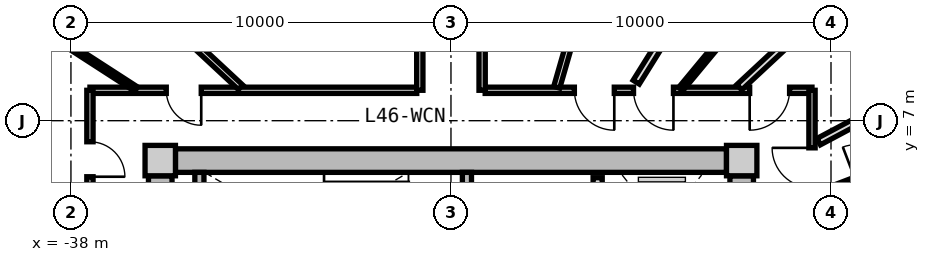
"""IFC4 building model, lengths in metres.
Left out: names, types, materials, properties, quantities, classifications, styles, units other than length and angle.
Written with IfcOpenShell. Run it as: python <this file> out.ifc"""

import sys

from ifc_helpers import new_model, si_unit, direction, frame, frame_2d, origin, origin_2d, place, context, subcontext, project, spatial, rectangle, extrude, source, transform, mapped, element, fill, save


model = new_model("IFC4")
c1 = context("Model", 3, precision=1e-05, world=origin(), true_north=direction((0.0, 1.0)))
c2 = subcontext(c1, "Body", "Model", "MODEL_VIEW")
j1 = project(units=[si_unit("LENGTHUNIT", "METRE"), si_unit("PLANEANGLEUNIT", "RADIAN")], contexts=[c1])
p1 = place(None, origin())
s1 = spatial("IfcSite", under=j1, at=p1, CompositionType="ELEMENT")
p2 = place(p1, origin())
s2 = spatial("IfcBuilding", under=s1, at=p2, CompositionType="ELEMENT")
p3 = place(p2, frame((0.0, 0.0, 149.55)))
s3 = spatial("IfcBuildingStorey", under=s2, at=p3, CompositionType="ELEMENT", Elevation=149.55)
m1 = source(origin(), c2, "Body", "SweptSolid", [
    extrude(rectangle(XDim=0.8, YDim=0.8, at=origin_2d()), origin(), (0.0, 0.0, 1.0), 3.05),
])
for number, where, z_axis, x_axis in (
    (1, (-20.35, 5.95, 0.0), (0.0, 0.0, 1.0), (1.0, 0.0, 0.0)),
    (2, (-35.65, 5.95, 0.0), (0.0, 0.0, 1.0), (1.0, 0.0, 0.0)),
):
    element("IfcColumn", number, at=place(p3, frame(where, z_axis=z_axis, x_axis=x_axis)), inside=s3, PredefinedType="COLUMN", context=c2, shape_type="MappedRepresentation", body=[
        mapped(m1, transform((0.0, 0.0, 0.0), x_axis=(1.0, 0.0, 0.0), y_axis=(0.0, 1.0, 0.0), z_axis=(0.0, 0.0, 1.0), scale=1.0)),
    ])
m2 = source(origin(), c2, "Body", "SweptSolid", [
    extrude(rectangle(XDim=14.5, YDim=0.62, at=frame_2d((7.25, 0.0))), origin(), (0.0, 0.0, 1.0), 2.81),
])
p4 = place(p3, frame((-35.25, 5.95, 0.0), z_axis=(0.0, 0.0, 1.0), x_axis=(1.0, 0.0, 0.0)))
e3 = element("IfcWall", 3, at=p4, inside=s3, PredefinedType="SHEAR", context=c2, shape_type="MappedRepresentation", body=[
    mapped(m2, transform((0.0, 0.0, 0.0), x_axis=(1.0, 0.0, 0.0), y_axis=(0.0, 1.0, 0.0), z_axis=(0.0, 0.0, 1.0), scale=1.0)),
])
m3 = source(origin(), c2, "Body", "SweptSolid", [
    extrude(rectangle(XDim=11.1, YDim=0.62, at=frame_2d((5.55, 0.0))), origin(), (0.0, 0.0, 1.0), 2.81),
])
p5 = place(p3, frame((-35.65, -5.55, 0.0), z_axis=(0.0, 0.0, 1.0), x_axis=(0.0, 1.0, 0.0)))
e4 = element("IfcWall", 4, at=p5, inside=s3, PredefinedType="SHEAR", context=c2, shape_type="MappedRepresentation", body=[
    mapped(m3, transform((0.0, 0.0, 0.0), x_axis=(1.0, 0.0, 0.0), y_axis=(0.0, 1.0, 0.0), z_axis=(0.0, 0.0, 1.0), scale=1.0)),
])
p6 = place(p5, frame((3.8, 0.0, 0.0)))
e5 = element("IfcOpeningElement", 5, at=p6, cuts=e4, PredefinedType="OPENING", context=c2, shape_type="SweptSolid", body=[
    extrude(rectangle(XDim=1.2, YDim=2.15, at=frame_2d((0.6, 1.075))), frame((0.0, 0.32, 0.0), z_axis=(0.0, -1.0, 0.0), x_axis=(1.0, 0.0, 0.0)), (0.0, 0.0, 1.0), 0.64),
])
p7 = place(p3, frame((-20.35, 5.55, 0.0), z_axis=(0.0, 0.0, 1.0), x_axis=(0.0, -1.0, 0.0)))
e6 = element("IfcWall", 6, at=p7, inside=s3, PredefinedType="SHEAR", context=c2, shape_type="MappedRepresentation", body=[
    mapped(m3, transform((0.0, 0.0, 0.0), x_axis=(1.0, 0.0, 0.0), y_axis=(0.0, 1.0, 0.0), z_axis=(0.0, 0.0, 1.0), scale=1.0)),
])
p8 = place(p7, frame((5.65, 0.0, 0.0)))
e7 = element("IfcOpeningElement", 7, at=p8, cuts=e6, PredefinedType="OPENING", context=c2, shape_type="SweptSolid", body=[
    extrude(rectangle(XDim=1.2, YDim=2.15, at=frame_2d((0.6, 1.075))), frame((0.0, 0.32, 0.0), z_axis=(0.0, -1.0, 0.0), x_axis=(1.0, 0.0, 0.0)), (0.0, 0.0, 1.0), 0.64),
])
p9 = place(p7, frame((9.3, 0.0, 0.0)))
e8 = element("IfcOpeningElement", 8, at=p9, cuts=e6, PredefinedType="OPENING", context=c2, shape_type="SweptSolid", body=[
    extrude(rectangle(XDim=1.0, YDim=2.1, at=frame_2d((0.5, 1.05))), frame((0.0, 0.32, 0.0), z_axis=(0.0, -1.0, 0.0), x_axis=(1.0, 0.0, 0.0)), (0.0, 0.0, 1.0), 0.64),
])
m4 = source(origin(), c2, "Body", "SweptSolid", [
    extrude(rectangle(XDim=3.19, YDim=0.24, at=frame_2d((1.595, 0.0))), origin(), (0.0, 0.0, 1.0), 2.81),
])
p10 = place(p3, frame((-34.62, 2.45, 0.0), z_axis=(0.0, 0.0, 1.0), x_axis=(0.0, 1.0, 0.0)))
e9 = element("IfcWall", 9, at=p10, inside=s3, PredefinedType="PARTITIONING", context=c2, shape_type="MappedRepresentation", body=[
    mapped(m4, transform((0.0, 0.0, 0.0), x_axis=(1.0, 0.0, 0.0), y_axis=(0.0, 1.0, 0.0), z_axis=(0.0, 0.0, 1.0), scale=1.0)),
])
p11 = place(p3, frame((-27.58, 2.45, 0.0), z_axis=(0.0, 0.0, 1.0), x_axis=(0.0, 1.0, 0.0)))
e10 = element("IfcWall", 10, at=p11, inside=s3, PredefinedType="PARTITIONING", context=c2, shape_type="MappedRepresentation", body=[
    mapped(m4, transform((0.0, 0.0, 0.0), x_axis=(1.0, 0.0, 0.0), y_axis=(0.0, 1.0, 0.0), z_axis=(0.0, 0.0, 1.0), scale=1.0)),
])
p12 = place(p11, frame((0.55, 0.0, 0.0)))
e11 = element("IfcOpeningElement", 11, at=p12, cuts=e10, PredefinedType="OPENING", context=c2, shape_type="SweptSolid", body=[
    extrude(rectangle(XDim=1.1, YDim=2.15, at=frame_2d((0.55, 1.075))), frame((0.0, 0.13, 0.0), z_axis=(0.0, -1.0, 0.0), x_axis=(1.0, 0.0, 0.0)), (0.0, 0.0, 1.0), 0.26),
])
m5 = source(origin(), c2, "Body", "SweptSolid", [
    extrude(rectangle(XDim=5.0, YDim=0.24, at=frame_2d((2.5, 0.0))), origin(), (0.0, 0.0, 1.0), 2.795),
])
p13 = place(p3, frame((-24.14, 0.5, 0.0), z_axis=(0.0, 0.0, 1.0), x_axis=(0.0, 1.0, 0.0)))
e12 = element("IfcWall", 12, at=p13, inside=s3, PredefinedType="PARTITIONING", context=c2, shape_type="MappedRepresentation", body=[
    mapped(m5, transform((0.0, 0.0, 0.0), x_axis=(1.0, 0.0, 0.0), y_axis=(0.0, 1.0, 0.0), z_axis=(0.0, 0.0, 1.0), scale=1.0)),
])
p14 = place(p13, frame((3.05, 0.0, 0.0)))
e13 = element("IfcOpeningElement", 13, at=p14, cuts=e12, PredefinedType="OPENING", context=c2, shape_type="SweptSolid", body=[
    extrude(rectangle(XDim=1.3, YDim=2.2, at=frame_2d((0.65, 1.1))), frame((0.0, 0.13, 0.0), z_axis=(0.0, -1.0, 0.0), x_axis=(1.0, 0.0, 0.0)), (0.0, 0.0, 1.0), 0.26),
])
p15 = place(p13, frame((0.55, 0.0, 0.0)))
e14 = element("IfcOpeningElement", 14, at=p15, cuts=e12, PredefinedType="OPENING", context=c2, shape_type="SweptSolid", body=[
    extrude(rectangle(XDim=1.3, YDim=2.2, at=frame_2d((0.65, 1.1))), frame((0.0, 0.13, 0.0), z_axis=(0.0, -1.0, 0.0), x_axis=(1.0, 0.0, 0.0)), (0.0, 0.0, 1.0), 0.26),
])
m6 = source(origin(), c2, "Body", "SweptSolid", [
    extrude(rectangle(XDim=8.6, YDim=0.165, at=frame_2d((4.3, 0.0))), origin(), (0.0, 0.0, 1.0), 2.795),
])
p16 = place(p3, frame((-37.5, 7.8, 0.0), z_axis=(0.0, 0.0, 1.0), x_axis=(1.0, 0.0, 0.0)))
e15 = element("IfcWall", 15, at=p16, inside=s3, PredefinedType="PARTITIONING", context=c2, shape_type="MappedRepresentation", body=[
    mapped(m6, transform((0.0, 0.0, 0.0), x_axis=(1.0, 0.0, 0.0), y_axis=(0.0, 1.0, 0.0), z_axis=(0.0, 0.0, 1.0), scale=1.0)),
])
p17 = place(p16, frame((2.009, 0.0, 0.0)))
e16 = element("IfcOpeningElement", 16, at=p17, cuts=e15, PredefinedType="OPENING", context=c2, shape_type="SweptSolid", body=[
    extrude(rectangle(XDim=0.92, YDim=2.1, at=frame_2d((0.46, 1.05))), frame((0.0, 0.093, 0.0), z_axis=(0.0, -1.0, 0.0), x_axis=(1.0, 0.0, 0.0)), (0.0, 0.0, 1.0), 0.185),
])
p18 = place(p3, frame((-27.1, 7.8, 0.0), z_axis=(0.0, 0.0, 1.0), x_axis=(1.0, 0.0, 0.0)))
e17 = element("IfcWall", 17, at=p18, inside=s3, PredefinedType="PARTITIONING", context=c2, shape_type="MappedRepresentation", body=[
    mapped(m6, transform((0.0, 0.0, 0.0), x_axis=(1.0, 0.0, 0.0), y_axis=(0.0, 1.0, 0.0), z_axis=(0.0, 0.0, 1.0), scale=1.0)),
])
p19 = place(p18, frame((6.96, 0.0, 0.0)))
e18 = element("IfcOpeningElement", 18, at=p19, cuts=e17, PredefinedType="OPENING", context=c2, shape_type="SweptSolid", body=[
    extrude(rectangle(XDim=1.05, YDim=2.15, at=frame_2d((0.525, 1.075))), frame((0.0, 0.093, 0.0), z_axis=(0.0, -1.0, 0.0), x_axis=(1.0, 0.0, 0.0)), (0.0, 0.0, 1.0), 0.185),
])
p20 = place(p18, frame((3.904, 0.0, 0.0)))
e19 = element("IfcOpeningElement", 19, at=p20, cuts=e17, PredefinedType="OPENING", context=c2, shape_type="SweptSolid", body=[
    extrude(rectangle(XDim=1.05, YDim=2.15, at=frame_2d((0.525, 1.075))), frame((0.0, 0.093, 0.0), z_axis=(0.0, -1.0, 0.0), x_axis=(1.0, 0.0, 0.0)), (0.0, 0.0, 1.0), 0.185),
])
p21 = place(p18, frame((2.347, 0.0, 0.0)))
e20 = element("IfcOpeningElement", 20, at=p21, cuts=e17, PredefinedType="OPENING", context=c2, shape_type="SweptSolid", body=[
    extrude(rectangle(XDim=1.05, YDim=2.15, at=frame_2d((0.525, 1.075))), frame((0.0, 0.093, 0.0), z_axis=(0.0, -1.0, 0.0), x_axis=(1.0, 0.0, 0.0)), (0.0, 0.0, 1.0), 0.185),
])
m7 = source(origin(), c2, "Body", "SweptSolid", [
    extrude(rectangle(XDim=15.6, YDim=0.165, at=frame_2d((7.8, 0.0))), origin(), (0.0, 0.0, 1.0), 2.795),
])
p22 = place(p3, frame((-37.5, -7.8, 0.0), z_axis=(0.0, 0.0, 1.0), x_axis=(0.0, 1.0, 0.0)))
e21 = element("IfcWall", 21, at=p22, inside=s3, PredefinedType="PARTITIONING", context=c2, shape_type="MappedRepresentation", body=[
    mapped(m7, transform((0.0, 0.0, 0.0), x_axis=(1.0, 0.0, 0.0), y_axis=(0.0, 1.0, 0.0), z_axis=(0.0, 0.0, 1.0), scale=1.0)),
])
p23 = place(p22, frame((13.325, 0.0, 0.0)))
e22 = element("IfcOpeningElement", 22, at=p23, cuts=e21, PredefinedType="OPENING", context=c2, shape_type="SweptSolid", body=[
    extrude(rectangle(XDim=0.92, YDim=2.1, at=frame_2d((0.46, 1.05))), frame((0.0, 0.093, 0.0), z_axis=(0.0, -1.0, 0.0), x_axis=(1.0, 0.0, 0.0)), (0.0, 0.0, 1.0), 0.185),
])
p24 = place(p22, frame((5.628, 0.0, 0.0)))
e23 = element("IfcOpeningElement", 23, at=p24, cuts=e21, PredefinedType="OPENING", context=c2, shape_type="SweptSolid", body=[
    extrude(rectangle(XDim=1.25, YDim=2.2, at=frame_2d((0.625, 1.1))), frame((0.0, 0.093, 0.0), z_axis=(0.0, -1.0, 0.0), x_axis=(1.0, 0.0, 0.0)), (0.0, 0.0, 1.0), 0.185),
])
p25 = place(p3, frame((-18.5, 7.8, 0.0), z_axis=(0.0, 0.0, 1.0), x_axis=(0.0, -1.0, 0.0)))
e24 = element("IfcWall", 24, at=p25, inside=s3, PredefinedType="PARTITIONING", context=c2, shape_type="MappedRepresentation", body=[
    mapped(m7, transform((0.0, 0.0, 0.0), x_axis=(1.0, 0.0, 0.0), y_axis=(0.0, 1.0, 0.0), z_axis=(0.0, 0.0, 1.0), scale=1.0)),
])
p26 = place(p25, frame((8.314, 0.0, 0.0)))
e25 = element("IfcOpeningElement", 25, at=p26, cuts=e24, PredefinedType="OPENING", context=c2, shape_type="SweptSolid", body=[
    extrude(rectangle(XDim=1.25, YDim=2.2, at=frame_2d((0.625, 1.1))), frame((0.0, 0.093, 0.0), z_axis=(0.0, -1.0, 0.0), x_axis=(1.0, 0.0, 0.0)), (0.0, 0.0, 1.0), 0.185),
])
p27 = place(p25, frame((1.515, 0.0, 0.0)))
e26 = element("IfcOpeningElement", 26, at=p27, cuts=e24, PredefinedType="OPENING", context=c2, shape_type="SweptSolid", body=[
    extrude(rectangle(XDim=1.05, YDim=2.15, at=frame_2d((0.525, 1.075))), frame((0.0, 0.093, 0.0), z_axis=(0.0, -1.0, 0.0), x_axis=(1.0, 0.0, 0.0)), (0.0, 0.0, 1.0), 0.185),
])
m8 = source(origin(), c2, "Body", "SweptSolid", [
    extrude(rectangle(XDim=9.73, YDim=0.165, at=frame_2d((4.865, 0.0))), origin(), (0.0, 0.0, 1.0), 2.345),
])
p28 = place(p3, frame((-25.217, 7.88, 0.0), z_axis=(0.0, 0.0, 1.0), x_axis=(0.27679492614, 0.960929013436, 0.0)))
e27 = element("IfcWall", 27, at=p28, inside=s3, PredefinedType="PARTITIONING", context=c2, shape_type="MappedRepresentation", body=[
    mapped(m8, transform((0.0, 0.0, 0.0), x_axis=(1.0, 0.0, 0.0), y_axis=(0.0, 1.0, 0.0), z_axis=(0.0, 0.0, 1.0), scale=1.0)),
])
m9 = source(origin(), c2, "Body", "SweptSolid", [
    extrude(rectangle(XDim=7.648, YDim=0.165, at=frame_2d((3.824, 0.0))), origin(), (0.0, 0.0, 1.0), 2.345),
])
p29 = place(p3, frame((-33.538, 7.88, 0.0), z_axis=(0.0, 0.0, 1.0), x_axis=(-0.732167856666, 0.681124239522, 0.0)))
e28 = element("IfcWall", 28, at=p29, inside=s3, PredefinedType="PARTITIONING", context=c2, shape_type="MappedRepresentation", body=[
    mapped(m9, transform((0.0, 0.0, 0.0), x_axis=(1.0, 0.0, 0.0), y_axis=(0.0, 1.0, 0.0), z_axis=(0.0, 0.0, 1.0), scale=1.0)),
])
m10 = source(origin(), c2, "Body", "SweptSolid", [
    extrude(rectangle(XDim=8.235, YDim=0.165, at=frame_2d((4.118, 0.0))), origin(), (0.0, 0.0, 1.0), 2.795),
])
p30 = place(p3, frame((-28.82, 7.8, 0.0), z_axis=(0.0, 0.0, 1.0), x_axis=(0.0, 1.0, 0.0)))
e29 = element("IfcWall", 29, at=p30, inside=s3, PredefinedType="PARTITIONING", context=c2, shape_type="MappedRepresentation", body=[
    mapped(m10, transform((0.0, 0.0, 0.0), x_axis=(1.0, 0.0, 0.0), y_axis=(0.0, 1.0, 0.0), z_axis=(0.0, 0.0, 1.0), scale=1.0)),
])
p31 = place(p30, frame((3.593, 0.0, 0.0)))
e30 = element("IfcOpeningElement", 30, at=p31, cuts=e29, PredefinedType="OPENING", context=c2, shape_type="SweptSolid", body=[
    extrude(rectangle(XDim=1.05, YDim=2.15, at=frame_2d((0.525, 1.075))), frame((0.0, 0.093, 0.0), z_axis=(0.0, -1.0, 0.0), x_axis=(1.0, 0.0, 0.0)), (0.0, 0.0, 1.0), 0.185),
])
p32 = place(p3, frame((-27.18, 7.8, 0.0), z_axis=(0.0, 0.0, 1.0), x_axis=(0.0, 1.0, 0.0)))
e31 = element("IfcWall", 31, at=p32, inside=s3, PredefinedType="PARTITIONING", context=c2, shape_type="MappedRepresentation", body=[
    mapped(m10, transform((0.0, 0.0, 0.0), x_axis=(1.0, 0.0, 0.0), y_axis=(0.0, 1.0, 0.0), z_axis=(0.0, 0.0, 1.0), scale=1.0)),
])
p33 = place(p32, frame((3.593, 0.0, 0.0)))
e32 = element("IfcOpeningElement", 32, at=p33, cuts=e31, PredefinedType="OPENING", context=c2, shape_type="SweptSolid", body=[
    extrude(rectangle(XDim=1.05, YDim=2.15, at=frame_2d((0.525, 1.075))), frame((0.0, 0.093, 0.0), z_axis=(0.0, -1.0, 0.0), x_axis=(1.0, 0.0, 0.0)), (0.0, 0.0, 1.0), 0.185),
])
m11 = source(origin(), c2, "Body", "SweptSolid", [
    extrude(rectangle(XDim=6.193, YDim=0.19, at=frame_2d((3.096, 0.0))), origin(), (0.0, 0.0, 1.0), 2.345),
])
p34 = place(p3, frame((-37.58, 4.419, 0.0), z_axis=(0.0, 0.0, 1.0), x_axis=(-0.970309243466, 0.241867674657, 0.0)))
e33 = element("IfcWall", 33, at=p34, inside=s3, PredefinedType="PARTITIONING", context=c2, shape_type="MappedRepresentation", body=[
    mapped(m11, transform((0.0, 0.0, 0.0), x_axis=(1.0, 0.0, 0.0), y_axis=(0.0, 1.0, 0.0), z_axis=(0.0, 0.0, 1.0), scale=1.0)),
])
m12 = source(origin(), c2, "Body", "SweptSolid", [
    extrude(rectangle(XDim=5.197, YDim=0.14, at=frame_2d((2.598, 0.0))), origin(), (0.0, 0.0, 1.0), 2.795),
])
p35 = place(p3, frame((-36.286, 7.83, 0.0), z_axis=(0.0, 0.0, 1.0), x_axis=(-0.839929187515, 0.542696010637, 0.0)))
e34 = element("IfcWall", 34, at=p35, inside=s3, PredefinedType="PARTITIONING", context=c2, shape_type="MappedRepresentation", body=[
    mapped(m12, transform((0.0, 0.0, 0.0), x_axis=(1.0, 0.0, 0.0), y_axis=(0.0, 1.0, 0.0), z_axis=(0.0, 0.0, 1.0), scale=1.0)),
])
m13 = source(origin(), c2, "Body", "SweptSolid", [
    extrude(rectangle(XDim=8.305, YDim=0.19, at=frame_2d((4.153, 0.0))), origin(), (0.0, 0.0, 1.0), 2.345),
])
p36 = place(p3, frame((-18.42, 3.908, 0.0), z_axis=(0.0, 0.0, 1.0), x_axis=(0.970309994378, 0.241864662175, 0.0)))
e35 = element("IfcWall", 35, at=p36, inside=s3, PredefinedType="PARTITIONING", context=c2, shape_type="MappedRepresentation", body=[
    mapped(m13, transform((0.0, 0.0, 0.0), x_axis=(1.0, 0.0, 0.0), y_axis=(0.0, 1.0, 0.0), z_axis=(0.0, 0.0, 1.0), scale=1.0)),
])
m14 = source(origin(), c2, "Body", "SweptSolid", [
    extrude(rectangle(XDim=7.648, YDim=0.19, at=frame_2d((3.824, 0.0))), origin(), (0.0, 0.0, 1.0), 2.345),
])
p37 = place(p3, frame((-20.413, 7.88, 0.0), z_axis=(0.0, 0.0, 1.0), x_axis=(0.732182665826, 0.681108320213, 0.0)))
e36 = element("IfcWall", 36, at=p37, inside=s3, PredefinedType="PARTITIONING", context=c2, shape_type="MappedRepresentation", body=[
    mapped(m14, transform((0.0, 0.0, 0.0), x_axis=(1.0, 0.0, 0.0), y_axis=(0.0, 1.0, 0.0), z_axis=(0.0, 0.0, 1.0), scale=1.0)),
])
m15 = source(origin(), c2, "Body", "SweptSolid", [
    extrude(rectangle(XDim=6.499, YDim=0.19, at=frame_2d((3.25, 0.0))), origin(), (0.0, 0.0, 1.0), 2.795),
])
p38 = place(p3, frame((-18.324, 6.449, 0.0), z_axis=(0.0, 0.0, 1.0), x_axis=(0.882715595921, 0.469907625729, 0.0)))
e37 = element("IfcWall", 37, at=p38, inside=s3, PredefinedType="PARTITIONING", context=c2, shape_type="MappedRepresentation", body=[
    mapped(m15, transform((0.0, 0.0, 0.0), x_axis=(1.0, 0.0, 0.0), y_axis=(0.0, 1.0, 0.0), z_axis=(0.0, 0.0, 1.0), scale=1.0)),
])
m16 = source(origin(), c2, "Body", "SweptSolid", [
    extrude(rectangle(XDim=3.295, YDim=0.14, at=frame_2d((1.647, 0.0))), origin(), (0.0, 0.0, 1.0), 2.795),
])
p39 = place(p3, frame((-18.47, 5.023, 0.0), z_axis=(0.0, 0.0, 1.0), x_axis=(0.934202224769, 0.356743890258, 0.0)))
e38 = element("IfcWall", 38, at=p39, inside=s3, PredefinedType="PARTITIONING", context=c2, shape_type="MappedRepresentation", body=[
    mapped(m16, transform((0.0, 0.0, 0.0), x_axis=(1.0, 0.0, 0.0), y_axis=(0.0, 1.0, 0.0), z_axis=(0.0, 0.0, 1.0), scale=1.0)),
])
p40 = place(p39, frame((1.188, 0.0, 0.0)))
e39 = element("IfcOpeningElement", 39, at=p40, cuts=e38, PredefinedType="OPENING", context=c2, shape_type="SweptSolid", body=[
    extrude(rectangle(XDim=0.92, YDim=2.1, at=frame_2d((0.46, 1.05))), frame((0.0, 0.08, 0.0), z_axis=(0.0, -1.0, 0.0), x_axis=(1.0, 0.0, 0.0)), (0.0, 0.0, 1.0), 0.16),
])
m17 = source(origin(), c2, "Body", "SweptSolid", [
    extrude(rectangle(XDim=8.422, YDim=0.19, at=frame_2d((4.211, 0.0))), origin(), (0.0, 0.0, 1.0), 2.795),
])
p41 = place(p3, frame((-23.125, 8.014, 0.0), z_axis=(0.0, 0.0, 1.0), x_axis=(0.52925352896, 0.848463730565, 0.0)))
e40 = element("IfcWall", 40, at=p41, inside=s3, PredefinedType="PARTITIONING", context=c2, shape_type="MappedRepresentation", body=[
    mapped(m17, transform((0.0, 0.0, 0.0), x_axis=(1.0, 0.0, 0.0), y_axis=(0.0, 1.0, 0.0), z_axis=(0.0, 0.0, 1.0), scale=1.0)),
])
m18 = source(origin(), c2, "Body", "SweptSolid", [
    extrude(rectangle(XDim=3.593, YDim=0.14, at=frame_2d((1.797, 0.0))), origin(), (0.0, 0.0, 1.0), 2.795),
])
p42 = place(p3, frame((-21.955, 7.83, 0.0), z_axis=(0.0, 0.0, 1.0), x_axis=(0.638271060163, 0.769811700196, 0.0)))
e41 = element("IfcWall", 41, at=p42, inside=s3, PredefinedType="PARTITIONING", context=c2, shape_type="MappedRepresentation", body=[
    mapped(m18, transform((0.0, 0.0, 0.0), x_axis=(1.0, 0.0, 0.0), y_axis=(0.0, 1.0, 0.0), z_axis=(0.0, 0.0, 1.0), scale=1.0)),
])
p43 = place(p42, frame((1.337, 0.0, 0.0)))
e42 = element("IfcOpeningElement", 42, at=p43, cuts=e41, PredefinedType="OPENING", context=c2, shape_type="SweptSolid", body=[
    extrude(rectangle(XDim=0.92, YDim=2.1, at=frame_2d((0.46, 1.05))), frame((0.0, 0.08, 0.0), z_axis=(0.0, -1.0, 0.0), x_axis=(1.0, 0.0, 0.0)), (0.0, 0.0, 1.0), 0.16),
])
m19 = source(origin(), c2, "Body", "SweptSolid", [
    extrude(rectangle(XDim=0.92, YDim=2.1, at=frame_2d((0.46, 1.05))), frame((0.0, 0.025, 0.0), z_axis=(0.0, -1.0, 0.0), x_axis=(1.0, 0.0, 0.0)), (0.0, 0.0, 1.0), 0.05),
])
p44 = place(p17, frame((0.92, 0.0, 0.0), z_axis=(0.0, 0.0, 1.0), x_axis=(-1.0, 0.0, 0.0)))
e43 = element("IfcDoor", 43, at=p44, inside=s3, OperationType="SINGLE_SWING_LEFT", PredefinedType="DOOR", context=c2, shape_type="MappedRepresentation", body=[
    mapped(m19, transform((0.0, 0.0, 0.0), x_axis=(1.0, 0.0, 0.0), y_axis=(0.0, 1.0, 0.0), z_axis=(0.0, 0.0, 1.0), scale=1.0)),
])
fill(e16, e43)
p45 = place(p23, frame((0.92, 0.0, 0.0), z_axis=(0.0, 0.0, 1.0), x_axis=(-1.0, 0.0, 0.0)))
e44 = element("IfcDoor", 44, at=p45, inside=s3, OperationType="SINGLE_SWING_RIGHT", PredefinedType="DOOR", context=c2, shape_type="MappedRepresentation", body=[
    mapped(m19, transform((0.0, 0.0, 0.0), x_axis=(1.0, 0.0, 0.0), y_axis=(0.0, 1.0, 0.0), z_axis=(0.0, 0.0, 1.0), scale=1.0)),
])
fill(e22, e44)
m20 = source(origin(), c2, "Body", "SweptSolid", [
    extrude(rectangle(XDim=1.05, YDim=2.15, at=frame_2d((0.525, 1.075))), frame((0.0, 0.025, 0.0), z_axis=(0.0, -1.0, 0.0), x_axis=(1.0, 0.0, 0.0)), (0.0, 0.0, 1.0), 0.05),
])
p46 = place(p27, frame((1.05, 0.0, 0.0), z_axis=(0.0, 0.0, 1.0), x_axis=(-1.0, 0.0, 0.0)))
e45 = element("IfcDoor", 45, at=p46, inside=s3, OperationType="SINGLE_SWING_RIGHT", PredefinedType="DOOR", context=c2, shape_type="MappedRepresentation", body=[
    mapped(m20, transform((0.0, 0.0, 0.0), x_axis=(1.0, 0.0, 0.0), y_axis=(0.0, 1.0, 0.0), z_axis=(0.0, 0.0, 1.0), scale=1.0)),
])
fill(e26, e45)
p47 = place(p19, frame((1.05, 0.0, 0.0), z_axis=(0.0, 0.0, 1.0), x_axis=(-1.0, 0.0, 0.0)))
e46 = element("IfcDoor", 46, at=p47, inside=s3, OperationType="SINGLE_SWING_RIGHT", PredefinedType="DOOR", context=c2, shape_type="MappedRepresentation", body=[
    mapped(m20, transform((0.0, 0.0, 0.0), x_axis=(1.0, 0.0, 0.0), y_axis=(0.0, 1.0, 0.0), z_axis=(0.0, 0.0, 1.0), scale=1.0)),
])
fill(e18, e46)
p48 = place(p20, frame((1.05, 0.0, 0.0), z_axis=(0.0, 0.0, 1.0), x_axis=(-1.0, 0.0, 0.0)))
e47 = element("IfcDoor", 47, at=p48, inside=s3, OperationType="SINGLE_SWING_LEFT", PredefinedType="DOOR", context=c2, shape_type="MappedRepresentation", body=[
    mapped(m20, transform((0.0, 0.0, 0.0), x_axis=(1.0, 0.0, 0.0), y_axis=(0.0, 1.0, 0.0), z_axis=(0.0, 0.0, 1.0), scale=1.0)),
])
fill(e19, e47)
p49 = place(p21, frame((1.05, 0.0, 0.0), z_axis=(0.0, 0.0, 1.0), x_axis=(-1.0, 0.0, 0.0)))
e48 = element("IfcDoor", 48, at=p49, inside=s3, OperationType="SINGLE_SWING_LEFT", PredefinedType="DOOR", context=c2, shape_type="MappedRepresentation", body=[
    mapped(m20, transform((0.0, 0.0, 0.0), x_axis=(1.0, 0.0, 0.0), y_axis=(0.0, 1.0, 0.0), z_axis=(0.0, 0.0, 1.0), scale=1.0)),
])
fill(e20, e48)
save(model, sys.argv[1])
